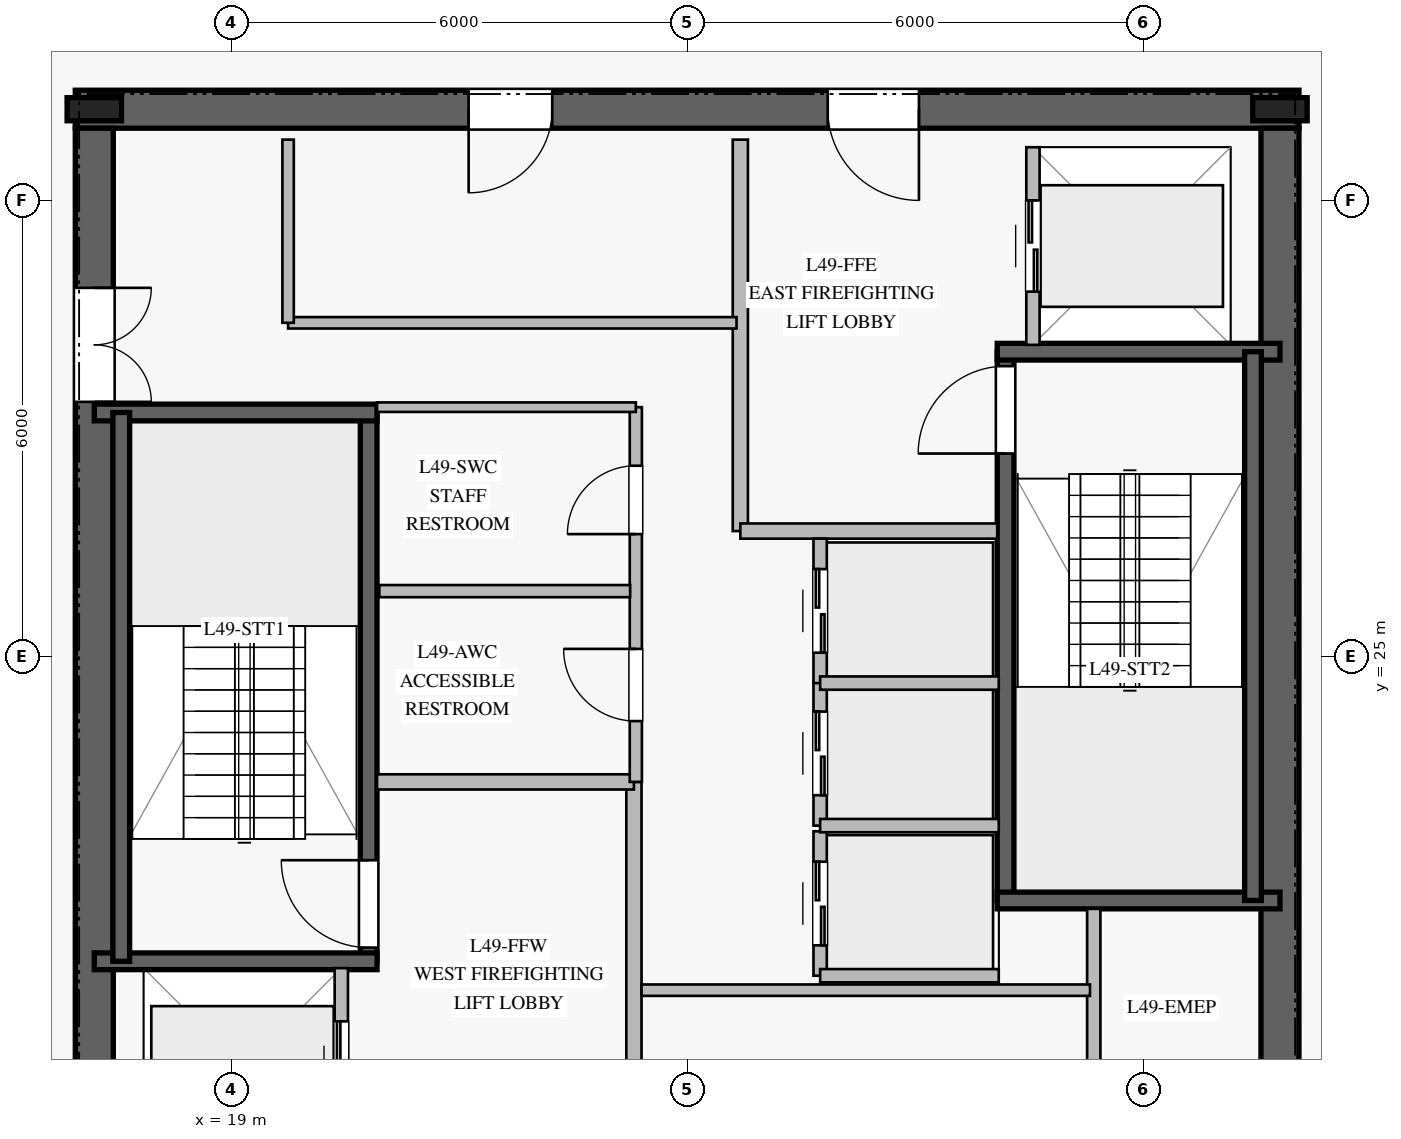
"""IFC4 building model, lengths in metres.
Left out: names, types, materials, properties, quantities, classifications, styles, units other than length and angle.
Written with IfcOpenShell. Run it as: python <this file> out.ifc"""

import sys

from ifc_helpers import new_model, si_unit, direction, frame, frame_2d, origin, origin_2d, place, context, subcontext, project, spatial, rectangle, i_section, extrude, element, fill, save


model = new_model("IFC4")
c1 = context("Model", 3, precision=1e-05, world=origin(), true_north=direction((0.0, 1.0)))
c2 = subcontext(c1, "Body", "Model", "MODEL_VIEW")
j1 = project(units=[si_unit("LENGTHUNIT", "METRE"), si_unit("PLANEANGLEUNIT", "RADIAN")], contexts=[c1])
p1 = place(None, origin())
s1 = spatial("IfcSite", under=j1, at=p1, CompositionType="ELEMENT")
p2 = place(p1, origin())
s2 = spatial("IfcBuilding", under=s1, at=p2, CompositionType="ELEMENT")
p3 = place(p2, frame((0.0, 0.0, 204.8)))
s3 = spatial("IfcBuildingStorey", under=s2, at=p3, CompositionType="ELEMENT", Elevation=204.8)
p4 = place(p3, frame((33.05, 32.2, 0.0), z_axis=(0.0, 0.0, 1.0), x_axis=(-1.0, 0.0, 0.0)))
e1 = element("IfcWall", 1, at=p4, inside=s3, PredefinedType="SHEAR", context=c2, shape_type="SweptSolid", body=[
    extrude(rectangle(XDim=16.1, YDim=0.5, at=frame_2d((8.05, 0.0))), origin(), (0.0, 0.0, 1.0), 3.78),
])
p5 = place(p4, frame((5.0, 0.0, 0.0)))
e2 = element("IfcOpeningElement", 2, at=p5, cuts=e1, PredefinedType="OPENING", context=c2, shape_type="SweptSolid", body=[
    extrude(rectangle(XDim=1.2, YDim=2.25, at=frame_2d((0.6, 1.125))), frame((0.0, 0.26, 0.0), z_axis=(0.0, -1.0, 0.0), x_axis=(1.0, 0.0, 0.0)), (0.0, 0.0, 1.0), 0.52),
])
p6 = place(p4, frame((9.825, 0.0, 0.0)))
e3 = element("IfcOpeningElement", 3, at=p6, cuts=e1, PredefinedType="OPENING", context=c2, shape_type="SweptSolid", body=[
    extrude(rectangle(XDim=1.1, YDim=2.2, at=frame_2d((0.55, 1.1))), frame((0.0, 0.26, 0.0), z_axis=(0.0, -1.0, 0.0), x_axis=(1.0, 0.0, 0.0)), (0.0, 0.0, 1.0), 0.52),
])
p7 = place(p3, frame((17.2, 31.95, 0.0), z_axis=(0.0, 0.0, 1.0), x_axis=(0.0, -1.0, 0.0)))
e4 = element("IfcWall", 4, at=p7, inside=s3, PredefinedType="SHEAR", context=c2, shape_type="SweptSolid", body=[
    extrude(rectangle(XDim=13.9, YDim=0.5, at=frame_2d((6.95, 0.0))), origin(), (0.0, 0.0, 1.0), 3.78),
])
p8 = place(p7, frame((2.1, 0.0, 0.0)))
e5 = element("IfcOpeningElement", 5, at=p8, cuts=e4, PredefinedType="OPENING", context=c2, shape_type="SweptSolid", body=[
    extrude(rectangle(XDim=1.5, YDim=2.2, at=frame_2d((0.75, 1.1))), frame((0.0, 0.26, 0.0), z_axis=(0.0, -1.0, 0.0), x_axis=(1.0, 0.0, 0.0)), (0.0, 0.0, 1.0), 0.52),
])
p9 = place(p3, frame((32.8, 18.05, 0.0), z_axis=(0.0, 0.0, 1.0), x_axis=(0.0, 1.0, 0.0)))
e6 = element("IfcWall", 6, at=p9, inside=s3, PredefinedType="SHEAR", context=c2, shape_type="SweptSolid", body=[
    extrude(rectangle(XDim=13.9, YDim=0.5, at=frame_2d((6.95, 0.0))), origin(), (0.0, 0.0, 1.0), 3.78),
])
for number, where, z_axis, x_axis in (
    (7, (32.8, 32.2, 0.0), (0.0, 0.0, 1.0), (1.0, 0.0, 0.0)),
    (8, (17.2, 32.2, 0.0), (0.0, 0.0, 1.0), (1.0, 0.0, 0.0)),
):
    element("IfcColumn", number, at=place(p3, frame(where, z_axis=z_axis, x_axis=x_axis)), inside=s3, PredefinedType="COLUMN", context=c2, shape_type="SweptSolid", body=[
        extrude(i_section(OverallWidth=0.304, OverallDepth=0.716, WebThickness=0.021, FlangeThickness=0.04, at=origin_2d()), origin(), (0.0, 0.0, 1.0), 4.0),
    ])
p10 = place(p3, frame((20.81, 20.99, 0.0), z_axis=(0.0, 0.0, 1.0), x_axis=(0.0, 1.0, 0.0)))
e9 = element("IfcWall", 9, at=p10, inside=s3, PredefinedType="SOLIDWALL", context=c2, shape_type="SweptSolid", body=[
    extrude(rectangle(XDim=7.22, YDim=0.22, at=frame_2d((3.61, 0.0))), origin(), (0.0, 0.0, 1.0), 3.78),
])
p11 = place(p10, frame((0.18, 0.0, 0.0)))
e10 = element("IfcOpeningElement", 10, at=p11, cuts=e9, PredefinedType="OPENING", context=c2, shape_type="SweptSolid", body=[
    extrude(rectangle(XDim=1.15, YDim=2.2, at=frame_2d((0.575, 1.1))), frame((0.0, 0.12, 0.0), z_axis=(0.0, -1.0, 0.0), x_axis=(1.0, 0.0, 0.0)), (0.0, 0.0, 1.0), 0.24),
])
for number, where, z_axis, x_axis in (
    (11, (17.2, 20.99, 0.0), (0.0, 0.0, 1.0), (1.0, 0.0, 0.0)),
    (12, (17.2, 28.21, 0.0), (0.0, 0.0, 1.0), (1.0, 0.0, 0.0)),
):
    element("IfcWall", number, at=place(p3, frame(where, z_axis=z_axis, x_axis=x_axis)), inside=s3, PredefinedType="SOLIDWALL", context=c2, shape_type="SweptSolid", body=[
        extrude(rectangle(XDim=3.72, YDim=0.22, at=frame_2d((1.86, 0.0))), origin(), (0.0, 0.0, 1.0), 3.78),
    ])
p12 = place(p3, frame((17.555, 28.21, 0.0), z_axis=(0.0, 0.0, 1.0), x_axis=(0.0, -1.0, 0.0)))
e13 = element("IfcWall", 13, at=p12, inside=s3, PredefinedType="SOLIDWALL", context=c2, shape_type="SweptSolid", body=[
    extrude(rectangle(XDim=7.22, YDim=0.22, at=frame_2d((3.61, 0.0))), origin(), (0.0, 0.0, 1.0), 3.78),
])
p13 = place(p3, frame((29.19, 21.79, 0.0), z_axis=(0.0, 0.0, 1.0), x_axis=(0.0, 1.0, 0.0)))
e14 = element("IfcWall", 14, at=p13, inside=s3, PredefinedType="SOLIDWALL", context=c2, shape_type="SweptSolid", body=[
    extrude(rectangle(XDim=7.22, YDim=0.22, at=frame_2d((3.61, 0.0))), origin(), (0.0, 0.0, 1.0), 3.78),
])
p14 = place(p13, frame((5.88, 0.0, 0.0)))
e15 = element("IfcOpeningElement", 15, at=p14, cuts=e14, PredefinedType="OPENING", context=c2, shape_type="SweptSolid", body=[
    extrude(rectangle(XDim=1.15, YDim=2.2, at=frame_2d((0.575, 1.1))), frame((0.0, 0.12, 0.0), z_axis=(0.0, -1.0, 0.0), x_axis=(1.0, 0.0, 0.0)), (0.0, 0.0, 1.0), 0.24),
])
for number, where, z_axis, x_axis in (
    (16, (29.08, 21.79, 0.0), (0.0, 0.0, 1.0), (1.0, 0.0, 0.0)),
    (17, (29.08, 29.01, 0.0), (0.0, 0.0, 1.0), (1.0, 0.0, 0.0)),
):
    element("IfcWall", number, at=place(p3, frame(where, z_axis=z_axis, x_axis=x_axis)), inside=s3, PredefinedType="SOLIDWALL", context=c2, shape_type="SweptSolid", body=[
        extrude(rectangle(XDim=3.72, YDim=0.22, at=frame_2d((1.86, 0.0))), origin(), (0.0, 0.0, 1.0), 3.78),
    ])
p15 = place(p3, frame((32.445, 29.01, 0.0), z_axis=(0.0, 0.0, 1.0), x_axis=(0.0, -1.0, 0.0)))
e18 = element("IfcWall", 18, at=p15, inside=s3, PredefinedType="SOLIDWALL", context=c2, shape_type="SweptSolid", body=[
    extrude(rectangle(XDim=7.22, YDim=0.22, at=frame_2d((3.61, 0.0))), origin(), (0.0, 0.0, 1.0), 3.78),
])
p16 = place(p3, frame((24.3, 18.2, 0.0), z_axis=(0.0, 0.0, 1.0), x_axis=(0.0, 1.0, 0.0)))
e19 = element("IfcWall", 19, at=p16, inside=s3, PredefinedType="PARTITIONING", context=c2, shape_type="SweptSolid", body=[
    extrude(rectangle(XDim=5.15, YDim=0.2, at=frame_2d((2.575, 0.0))), origin(), (0.0, 0.0, 1.0), 3.78),
])
p17 = place(p3, frame((20.92, 23.35, 0.0), z_axis=(0.0, 0.0, 1.0), x_axis=(1.0, 0.0, 0.0)))
e20 = element("IfcWall", 20, at=p17, inside=s3, PredefinedType="PARTITIONING", context=c2, shape_type="SweptSolid", body=[
    extrude(rectangle(XDim=3.38, YDim=0.2, at=frame_2d((1.69, 0.0))), origin(), (0.0, 0.0, 1.0), 3.78),
])
p18 = place(p3, frame((25.7, 26.65, 0.0), z_axis=(0.0, 0.0, 1.0), x_axis=(0.0, 1.0, 0.0)))
e21 = element("IfcWall", 21, at=p18, inside=s3, PredefinedType="PARTITIONING", context=c2, shape_type="SweptSolid", body=[
    extrude(rectangle(XDim=5.15, YDim=0.2, at=frame_2d((2.575, 0.0))), origin(), (0.0, 0.0, 1.0), 3.78),
])
p19 = place(p3, frame((25.7, 26.65, 0.0), z_axis=(0.0, 0.0, 1.0), x_axis=(1.0, 0.0, 0.0)))
e22 = element("IfcWall", 22, at=p19, inside=s3, PredefinedType="PARTITIONING", context=c2, shape_type="SweptSolid", body=[
    extrude(rectangle(XDim=3.38, YDim=0.2, at=frame_2d((1.69, 0.0))), origin(), (0.0, 0.0, 1.0), 3.78),
])
p20 = place(p3, frame((24.325, 23.35, 0.0), z_axis=(0.0, 0.0, 1.0), x_axis=(0.0, 1.0, 0.0)))
e23 = element("IfcWall", 23, at=p20, inside=s3, PredefinedType="PLUMBINGWALL", context=c2, shape_type="SweptSolid", body=[
    extrude(rectangle(XDim=4.93, YDim=0.16, at=frame_2d((2.465, 0.0))), origin(), (0.0, 0.0, 1.0), 3.78),
])
p21 = place(p20, frame((0.8, 0.0, 0.0)))
e24 = element("IfcOpeningElement", 24, at=p21, cuts=e23, PredefinedType="OPENING", context=c2, shape_type="SweptSolid", body=[
    extrude(rectangle(XDim=0.95, YDim=2.1, at=frame_2d((0.475, 1.05))), frame((0.0, 0.09, 0.0), z_axis=(0.0, -1.0, 0.0), x_axis=(1.0, 0.0, 0.0)), (0.0, 0.0, 1.0), 0.18),
])
p22 = place(p20, frame((3.26, 0.0, 0.0)))
e25 = element("IfcOpeningElement", 25, at=p22, cuts=e23, PredefinedType="OPENING", context=c2, shape_type="SweptSolid", body=[
    extrude(rectangle(XDim=0.9, YDim=2.1, at=frame_2d((0.45, 1.05))), frame((0.0, 0.09, 0.0), z_axis=(0.0, -1.0, 0.0), x_axis=(1.0, 0.0, 0.0)), (0.0, 0.0, 1.0), 0.18),
])
p23 = place(p3, frame((20.92, 28.28, 0.0), z_axis=(0.0, 0.0, 1.0), x_axis=(1.0, 0.0, 0.0)))
e26 = element("IfcWall", 26, at=p23, inside=s3, PredefinedType="PARTITIONING", context=c2, shape_type="SweptSolid", body=[
    extrude(rectangle(XDim=3.405, YDim=0.125, at=frame_2d((1.703, 0.0))), origin(), (0.0, 0.0, 1.0), 3.78),
])
p24 = place(p3, frame((20.95, 25.86, 0.0), z_axis=(0.0, 0.0, 1.0), x_axis=(1.0, 0.0, 0.0)))
e27 = element("IfcWall", 27, at=p24, inside=s3, PredefinedType="PLUMBINGWALL", context=c2, shape_type="SweptSolid", body=[
    extrude(rectangle(XDim=3.3, YDim=0.16, at=frame_2d((1.65, 0.0))), origin(), (0.0, 0.0, 1.0), 3.78),
])
p25 = place(p3, frame((30.35, 18.2, 0.0), z_axis=(0.0, 0.0, 1.0), x_axis=(0.0, 1.0, 0.0)))
e28 = element("IfcWall", 28, at=p25, inside=s3, PredefinedType="PARTITIONING", context=c2, shape_type="SweptSolid", body=[
    extrude(rectangle(XDim=3.48, YDim=0.175, at=frame_2d((1.74, 0.0))), origin(), (0.0, 0.0, 1.0), 3.78),
])
p26 = place(p3, frame((24.4, 20.61, 0.0), z_axis=(0.0, 0.0, 1.0), x_axis=(1.0, 0.0, 0.0)))
e29 = element("IfcWall", 29, at=p26, inside=s3, PredefinedType="PARTITIONING", context=c2, shape_type="SweptSolid", body=[
    extrude(rectangle(XDim=5.9, YDim=0.15, at=frame_2d((2.95, 0.0))), origin(), (0.0, 0.0, 1.0), 3.78),
])
p27 = place(p3, frame((19.75, 29.39, 0.0), z_axis=(0.0, 0.0, 1.0), x_axis=(1.0, 0.0, 0.0)))
e30 = element("IfcWall", 30, at=p27, inside=s3, PredefinedType="PARTITIONING", context=c2, shape_type="SweptSolid", body=[
    extrude(rectangle(XDim=5.9, YDim=0.15, at=frame_2d((2.95, 0.0))), origin(), (0.0, 0.0, 1.0), 3.78),
])
p28 = place(p3, frame((19.75, 29.39, 0.0), z_axis=(0.0, 0.0, 1.0), x_axis=(0.0, 1.0, 0.0)))
e31 = element("IfcWall", 31, at=p28, inside=s3, PredefinedType="PARTITIONING", context=c2, shape_type="SweptSolid", body=[
    extrude(rectangle(XDim=2.41, YDim=0.15, at=frame_2d((1.205, 0.0))), origin(), (0.0, 0.0, 1.0), 3.78),
])
p29 = place(p3, frame((26.75, 20.8, 0.0), z_axis=(0.0, 0.0, 1.0), x_axis=(0.0, 1.0, 0.0)))
e32 = element("IfcWall", 32, at=p29, inside=s3, PredefinedType="PARTITIONING", context=c2, shape_type="SweptSolid", body=[
    extrude(rectangle(XDim=1.9, YDim=0.175, at=frame_2d((0.95, 0.0))), origin(), (0.0, 0.0, 1.0), 3.78),
])
p30 = place(p29, frame((0.4, 0.0, 0.0)))
e33 = element("IfcOpeningElement", 33, at=p30, cuts=e32, PredefinedType="OPENING", context=c2, shape_type="SweptSolid", body=[
    extrude(rectangle(XDim=1.1, YDim=2.2, at=frame_2d((0.55, 1.1))), frame((0.0, 0.098, 0.0), z_axis=(0.0, -1.0, 0.0), x_axis=(1.0, 0.0, 0.0)), (0.0, 0.0, 1.0), 0.195),
])
p31 = place(p3, frame((26.75, 20.8, 0.0), z_axis=(0.0, 0.0, 1.0), x_axis=(1.0, 0.0, 0.0)))
e34 = element("IfcWall", 34, at=p31, inside=s3, PredefinedType="PARTITIONING", context=c2, shape_type="SweptSolid", body=[
    extrude(rectangle(XDim=2.35, YDim=0.175, at=frame_2d((1.175, 0.0))), origin(), (0.0, 0.0, 1.0), 3.78),
])
p32 = place(p3, frame((26.75, 22.775, 0.0), z_axis=(0.0, 0.0, 1.0), x_axis=(0.0, 1.0, 0.0)))
e35 = element("IfcWall", 35, at=p32, inside=s3, PredefinedType="PARTITIONING", context=c2, shape_type="SweptSolid", body=[
    extrude(rectangle(XDim=1.9, YDim=0.175, at=frame_2d((0.95, 0.0))), origin(), (0.0, 0.0, 1.0), 3.78),
])
p33 = place(p32, frame((0.4, 0.0, 0.0)))
e36 = element("IfcOpeningElement", 36, at=p33, cuts=e35, PredefinedType="OPENING", context=c2, shape_type="SweptSolid", body=[
    extrude(rectangle(XDim=1.1, YDim=2.2, at=frame_2d((0.55, 1.1))), frame((0.0, 0.098, 0.0), z_axis=(0.0, -1.0, 0.0), x_axis=(1.0, 0.0, 0.0)), (0.0, 0.0, 1.0), 0.195),
])
p34 = place(p3, frame((26.75, 22.775, 0.0), z_axis=(0.0, 0.0, 1.0), x_axis=(1.0, 0.0, 0.0)))
e37 = element("IfcWall", 37, at=p34, inside=s3, PredefinedType="PARTITIONING", context=c2, shape_type="SweptSolid", body=[
    extrude(rectangle(XDim=2.35, YDim=0.175, at=frame_2d((1.175, 0.0))), origin(), (0.0, 0.0, 1.0), 3.78),
])
p35 = place(p3, frame((26.75, 24.65, 0.0), z_axis=(0.0, 0.0, 1.0), x_axis=(0.0, 1.0, 0.0)))
e38 = element("IfcWall", 38, at=p35, inside=s3, PredefinedType="PARTITIONING", context=c2, shape_type="SweptSolid", body=[
    extrude(rectangle(XDim=1.9, YDim=0.175, at=frame_2d((0.95, 0.0))), origin(), (0.0, 0.0, 1.0), 3.78),
])
p36 = place(p35, frame((0.4, 0.0, 0.0)))
e39 = element("IfcOpeningElement", 39, at=p36, cuts=e38, PredefinedType="OPENING", context=c2, shape_type="SweptSolid", body=[
    extrude(rectangle(XDim=1.1, YDim=2.2, at=frame_2d((0.55, 1.1))), frame((0.0, 0.098, 0.0), z_axis=(0.0, -1.0, 0.0), x_axis=(1.0, 0.0, 0.0)), (0.0, 0.0, 1.0), 0.195),
])
p37 = place(p3, frame((26.75, 24.65, 0.0), z_axis=(0.0, 0.0, 1.0), x_axis=(1.0, 0.0, 0.0)))
e40 = element("IfcWall", 40, at=p37, inside=s3, PredefinedType="PARTITIONING", context=c2, shape_type="SweptSolid", body=[
    extrude(rectangle(XDim=2.35, YDim=0.175, at=frame_2d((1.175, 0.0))), origin(), (0.0, 0.0, 1.0), 3.78),
])
p38 = place(p3, frame((20.45, 18.3, 0.0), z_axis=(0.0, 0.0, 1.0), x_axis=(0.0, 1.0, 0.0)))
e41 = element("IfcWall", 41, at=p38, inside=s3, PredefinedType="PARTITIONING", context=c2, shape_type="SweptSolid", body=[
    extrude(rectangle(XDim=2.6, YDim=0.175, at=frame_2d((1.3, 0.0))), origin(), (0.0, 0.0, 1.0), 3.78),
])
p39 = place(p38, frame((0.7, 0.0, 0.0)))
e42 = element("IfcOpeningElement", 42, at=p39, cuts=e41, PredefinedType="OPENING", context=c2, shape_type="SweptSolid", body=[
    extrude(rectangle(XDim=1.2, YDim=2.2, at=frame_2d((0.6, 1.1))), frame((0.0, 0.098, 0.0), z_axis=(0.0, -1.0, 0.0), x_axis=(1.0, 0.0, 0.0)), (0.0, 0.0, 1.0), 0.195),
])
p40 = place(p3, frame((29.55, 29.1, 0.0), z_axis=(0.0, 0.0, 1.0), x_axis=(0.0, 1.0, 0.0)))
e43 = element("IfcWall", 43, at=p40, inside=s3, PredefinedType="PARTITIONING", context=c2, shape_type="SweptSolid", body=[
    extrude(rectangle(XDim=2.6, YDim=0.175, at=frame_2d((1.3, 0.0))), origin(), (0.0, 0.0, 1.0), 3.78),
])
p41 = place(p40, frame((0.7, 0.0, 0.0)))
e44 = element("IfcOpeningElement", 44, at=p41, cuts=e43, PredefinedType="OPENING", context=c2, shape_type="SweptSolid", body=[
    extrude(rectangle(XDim=1.2, YDim=2.2, at=frame_2d((0.6, 1.1))), frame((0.0, 0.098, 0.0), z_axis=(0.0, -1.0, 0.0), x_axis=(1.0, 0.0, 0.0)), (0.0, 0.0, 1.0), 0.195),
])
p42 = place(p11, origin())
e45 = element("IfcDoor", 45, at=p42, inside=s3, OperationType="SINGLE_SWING_RIGHT", PredefinedType="DOOR", context=c2, shape_type="SweptSolid", body=[
    extrude(rectangle(XDim=1.15, YDim=2.2, at=frame_2d((0.575, 1.1))), frame((0.0, 0.025, 0.0), z_axis=(0.0, -1.0, 0.0), x_axis=(1.0, 0.0, 0.0)), (0.0, 0.0, 1.0), 0.05),
])
fill(e10, e45)
p43 = place(p14, origin())
e46 = element("IfcDoor", 46, at=p43, inside=s3, OperationType="SINGLE_SWING_LEFT", PredefinedType="DOOR", context=c2, shape_type="SweptSolid", body=[
    extrude(rectangle(XDim=1.15, YDim=2.2, at=frame_2d((0.575, 1.1))), frame((0.0, 0.025, 0.0), z_axis=(0.0, -1.0, 0.0), x_axis=(1.0, 0.0, 0.0)), (0.0, 0.0, 1.0), 0.05),
])
fill(e15, e46)
p44 = place(p5, origin())
e47 = element("IfcDoor", 47, at=p44, inside=s3, OperationType="SINGLE_SWING_LEFT", PredefinedType="DOOR", context=c2, shape_type="SweptSolid", body=[
    extrude(rectangle(XDim=1.2, YDim=2.25, at=frame_2d((0.6, 1.125))), frame((0.0, 0.025, 0.0), z_axis=(0.0, -1.0, 0.0), x_axis=(1.0, 0.0, 0.0)), (0.0, 0.0, 1.0), 0.05),
])
fill(e2, e47)
p45 = place(p8, origin())
e48 = element("IfcDoor", 48, at=p45, inside=s3, OperationType="DOUBLE_DOOR_SINGLE_SWING", PredefinedType="DOOR", context=c2, shape_type="SweptSolid", body=[
    extrude(rectangle(XDim=1.5, YDim=2.2, at=frame_2d((0.75, 1.1))), frame((0.0, 0.025, 0.0), z_axis=(0.0, -1.0, 0.0), x_axis=(1.0, 0.0, 0.0)), (0.0, 0.0, 1.0), 0.05),
])
fill(e5, e48)
p46 = place(p21, origin())
e49 = element("IfcDoor", 49, at=p46, inside=s3, OperationType="SINGLE_SWING_RIGHT", PredefinedType="DOOR", context=c2, shape_type="SweptSolid", body=[
    extrude(rectangle(XDim=0.95, YDim=2.1, at=frame_2d((0.475, 1.05))), frame((0.0, 0.025, 0.0), z_axis=(0.0, -1.0, 0.0), x_axis=(1.0, 0.0, 0.0)), (0.0, 0.0, 1.0), 0.05),
])
fill(e24, e49)
p47 = place(p22, origin())
e50 = element("IfcDoor", 50, at=p47, inside=s3, OperationType="SINGLE_SWING_LEFT", PredefinedType="DOOR", context=c2, shape_type="SweptSolid", body=[
    extrude(rectangle(XDim=0.9, YDim=2.1, at=frame_2d((0.45, 1.05))), frame((0.0, 0.025, 0.0), z_axis=(0.0, -1.0, 0.0), x_axis=(1.0, 0.0, 0.0)), (0.0, 0.0, 1.0), 0.05),
])
fill(e25, e50)
p48 = place(p6, origin())
e51 = element("IfcDoor", 51, at=p48, inside=s3, OperationType="SINGLE_SWING_RIGHT", PredefinedType="DOOR", context=c2, shape_type="SweptSolid", body=[
    extrude(rectangle(XDim=1.1, YDim=2.2, at=frame_2d((0.55, 1.1))), frame((0.0, 0.025, 0.0), z_axis=(0.0, -1.0, 0.0), x_axis=(1.0, 0.0, 0.0)), (0.0, 0.0, 1.0), 0.05),
])
fill(e3, e51)
p49 = place(p30, origin())
e52 = element("IfcDoor", 52, at=p49, inside=s3, OperationType="DOUBLE_DOOR_SLIDING", PredefinedType="DOOR", context=c2, shape_type="SweptSolid", body=[
    extrude(rectangle(XDim=1.1, YDim=2.2, at=frame_2d((0.55, 1.1))), frame((0.0, 0.025, 0.0), z_axis=(0.0, -1.0, 0.0), x_axis=(1.0, 0.0, 0.0)), (0.0, 0.0, 1.0), 0.05),
])
fill(e33, e52)
p50 = place(p33, origin())
e53 = element("IfcDoor", 53, at=p50, inside=s3, OperationType="DOUBLE_DOOR_SLIDING", PredefinedType="DOOR", context=c2, shape_type="SweptSolid", body=[
    extrude(rectangle(XDim=1.1, YDim=2.2, at=frame_2d((0.55, 1.1))), frame((0.0, 0.025, 0.0), z_axis=(0.0, -1.0, 0.0), x_axis=(1.0, 0.0, 0.0)), (0.0, 0.0, 1.0), 0.05),
])
fill(e36, e53)
p51 = place(p36, origin())
e54 = element("IfcDoor", 54, at=p51, inside=s3, OperationType="DOUBLE_DOOR_SLIDING", PredefinedType="DOOR", context=c2, shape_type="SweptSolid", body=[
    extrude(rectangle(XDim=1.1, YDim=2.2, at=frame_2d((0.55, 1.1))), frame((0.0, 0.025, 0.0), z_axis=(0.0, -1.0, 0.0), x_axis=(1.0, 0.0, 0.0)), (0.0, 0.0, 1.0), 0.05),
])
fill(e39, e54)
p52 = place(p39, origin())
e55 = element("IfcDoor", 55, at=p52, inside=s3, OperationType="DOUBLE_DOOR_SLIDING", PredefinedType="DOOR", context=c2, shape_type="SweptSolid", body=[
    extrude(rectangle(XDim=1.2, YDim=2.2, at=frame_2d((0.6, 1.1))), frame((0.0, 0.025, 0.0), z_axis=(0.0, -1.0, 0.0), x_axis=(1.0, 0.0, 0.0)), (0.0, 0.0, 1.0), 0.05),
])
fill(e42, e55)
p53 = place(p41, origin())
e56 = element("IfcDoor", 56, at=p53, inside=s3, OperationType="DOUBLE_DOOR_SLIDING", PredefinedType="DOOR", context=c2, shape_type="SweptSolid", body=[
    extrude(rectangle(XDim=1.2, YDim=2.2, at=frame_2d((0.6, 1.1))), frame((0.0, 0.025, 0.0), z_axis=(0.0, -1.0, 0.0), x_axis=(1.0, 0.0, 0.0)), (0.0, 0.0, 1.0), 0.05),
])
fill(e44, e56)
save(model, sys.argv[1])
